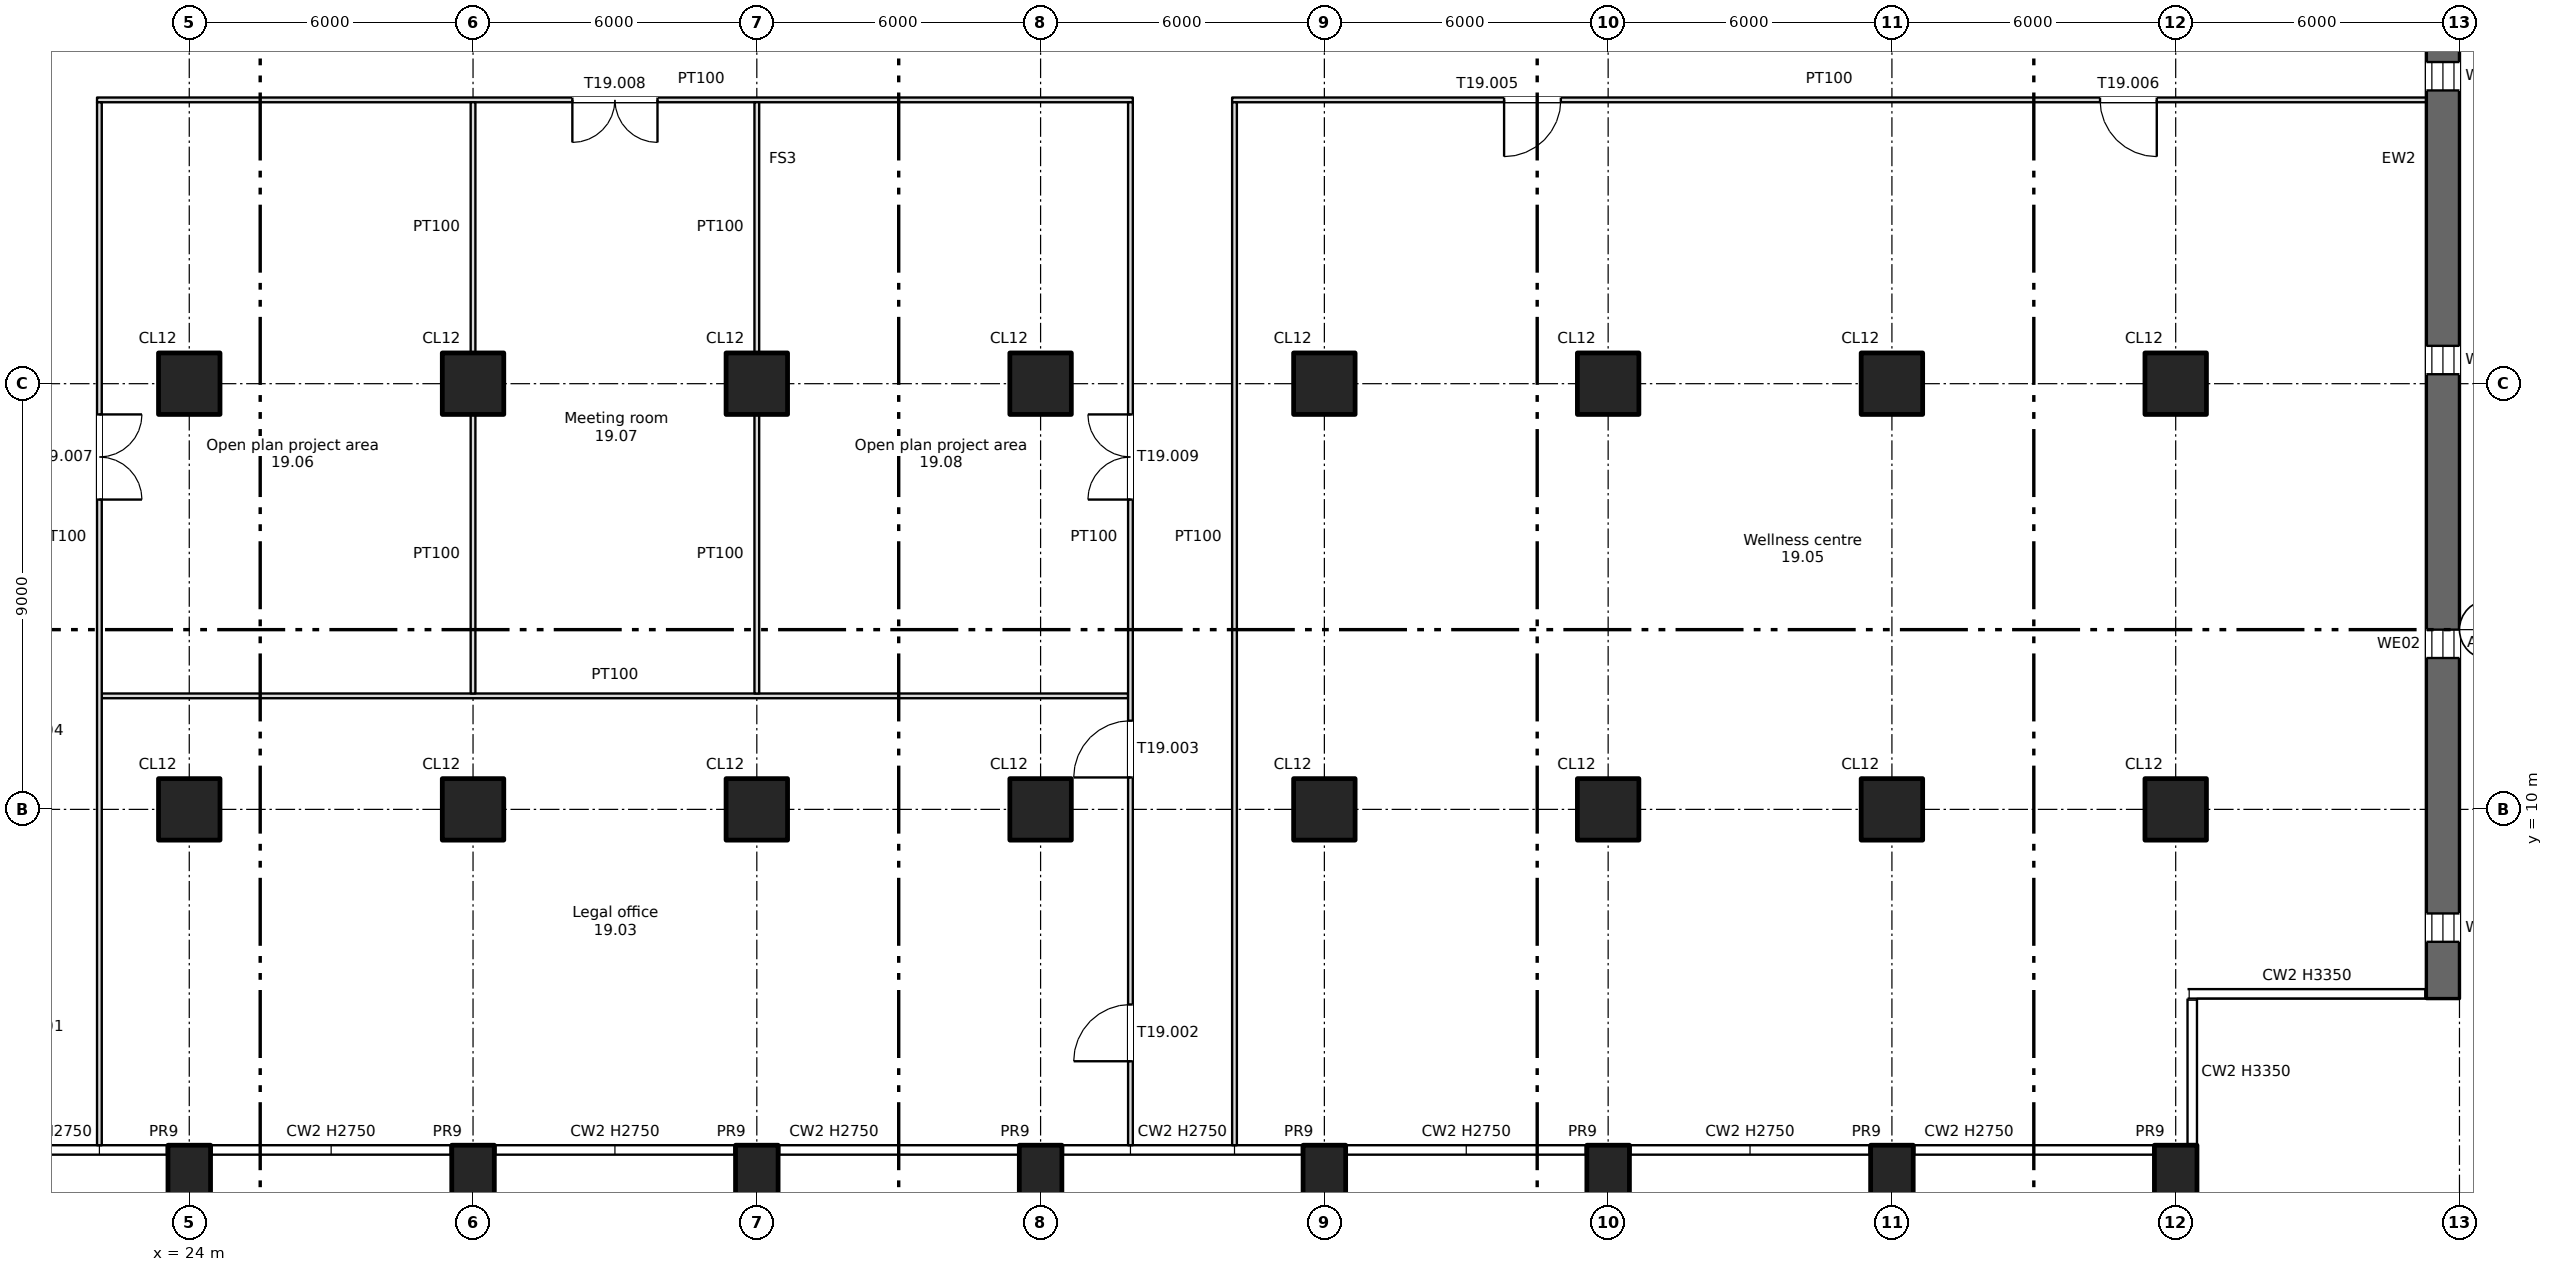
"""IFC4 building model, lengths in metres.
Left out: names, types, materials, properties, quantities, classifications, styles, units other than length and angle.
Written with IfcOpenShell. Run it as: python <this file> out.ifc"""

import sys

from ifc_helpers import new_model, si_unit, direction, frame, frame_2d, origin, origin_2d, place, context, subcontext, project, spatial, rectangle, extrude, element, fill, save


model = new_model("IFC4")
c1 = context("Model", 3, precision=1e-05, world=origin(), true_north=direction((0.0, 1.0)))
c2 = subcontext(c1, "Body", "Model", "MODEL_VIEW")
j1 = project(units=[si_unit("LENGTHUNIT", "METRE"), si_unit("PLANEANGLEUNIT", "RADIAN")], contexts=[c1])
p1 = place(None, origin())
s1 = spatial("IfcSite", under=j1, at=p1, CompositionType="ELEMENT")
p2 = place(p1, origin())
s2 = spatial("IfcBuilding", under=s1, at=p2, CompositionType="ELEMENT")
p3 = place(p2, frame((0.0, 0.0, 125.0)))
s3 = spatial("IfcBuildingStorey", under=s2, at=p3, CompositionType="ELEMENT", Elevation=125.0)
for number, where, z_axis, x_axis in (
    (1, (24.0, 2.2, -0.4), (0.0, 0.0, 1.0), (1.0, 0.0, 0.0)),
    (2, (30.0, 2.2, -0.4), (0.0, 0.0, 1.0), (1.0, 0.0, 0.0)),
    (3, (36.0, 2.2, -0.4), (0.0, 0.0, 1.0), (1.0, 0.0, 0.0)),
    (4, (42.0, 2.2, -0.4), (0.0, 0.0, 1.0), (1.0, 0.0, 0.0)),
    (5, (48.0, 2.2, -0.4), (0.0, 0.0, 1.0), (1.0, 0.0, 0.0)),
    (6, (54.0, 2.2, -0.4), (0.0, 0.0, 1.0), (1.0, 0.0, 0.0)),
    (7, (60.0, 2.2, -0.4), (0.0, 0.0, 1.0), (1.0, 0.0, 0.0)),
    (8, (66.0, 2.2, -0.4), (0.0, 0.0, 1.0), (1.0, 0.0, 0.0)),
):
    element("IfcColumn", number, at=place(p3, frame(where, z_axis=z_axis, x_axis=x_axis)), inside=s3, PredefinedType="COLUMN", context=c2, shape_type="SweptSolid", body=[
        extrude(rectangle(XDim=0.9, YDim=1.4, at=origin_2d()), origin(), (0.0, 0.0, 1.0), 3.75),
    ])
for number, where, z_axis, x_axis in (
    (9, (24.0, 10.0, 0.0), (0.0, 0.0, 1.0), (1.0, 0.0, 0.0)),
    (10, (24.0, 19.0, 0.0), (0.0, 0.0, 1.0), (1.0, 0.0, 0.0)),
    (11, (30.0, 10.0, 0.0), (0.0, 0.0, 1.0), (1.0, 0.0, 0.0)),
    (12, (30.0, 19.0, 0.0), (0.0, 0.0, 1.0), (1.0, 0.0, 0.0)),
    (13, (36.0, 10.0, 0.0), (0.0, 0.0, 1.0), (1.0, 0.0, 0.0)),
    (14, (36.0, 19.0, 0.0), (0.0, 0.0, 1.0), (1.0, 0.0, 0.0)),
    (15, (42.0, 10.0, 0.0), (0.0, 0.0, 1.0), (1.0, 0.0, 0.0)),
    (16, (42.0, 19.0, 0.0), (0.0, 0.0, 1.0), (1.0, 0.0, 0.0)),
    (17, (48.0, 10.0, 0.0), (0.0, 0.0, 1.0), (1.0, 0.0, 0.0)),
    (18, (48.0, 19.0, 0.0), (0.0, 0.0, 1.0), (1.0, 0.0, 0.0)),
    (19, (54.0, 10.0, 0.0), (0.0, 0.0, 1.0), (1.0, 0.0, 0.0)),
    (20, (54.0, 19.0, 0.0), (0.0, 0.0, 1.0), (1.0, 0.0, 0.0)),
    (21, (60.0, 10.0, 0.0), (0.0, 0.0, 1.0), (1.0, 0.0, 0.0)),
    (22, (60.0, 19.0, 0.0), (0.0, 0.0, 1.0), (1.0, 0.0, 0.0)),
    (23, (66.0, 10.0, 0.0), (0.0, 0.0, 1.0), (1.0, 0.0, 0.0)),
    (24, (66.0, 19.0, 0.0), (0.0, 0.0, 1.0), (1.0, 0.0, 0.0)),
):
    element("IfcColumn", number, at=place(p3, frame(where, z_axis=z_axis, x_axis=x_axis)), inside=s3, PredefinedType="COLUMN", context=c2, shape_type="SweptSolid", body=[
        extrude(rectangle(XDim=1.3, YDim=1.3, at=origin_2d()), origin(), (0.0, 0.0, 1.0), 3.35),
    ])
p4 = place(p3, frame((71.65, 6.0, 0.0), z_axis=(0.0, 0.0, 1.0), x_axis=(0.0, 1.0, 0.0)))
e25 = element("IfcWall", 25, at=p4, inside=s3, PredefinedType="SHEAR", context=c2, shape_type="SweptSolid", body=[
    extrude(rectangle(XDim=35.5, YDim=0.7, at=frame_2d((17.75, 0.0))), origin(), (0.0, 0.0, 1.0), 3.35),
])
p5 = place(p4, frame((1.2, 0.0, 0.6)))
e26 = element("IfcOpeningElement", 26, at=p5, cuts=e25, PredefinedType="OPENING", context=c2, shape_type="SweptSolid", body=[
    extrude(rectangle(XDim=0.6, YDim=2.4, at=frame_2d((0.3, 1.2))), frame((0.0, 0.36, 0.0), z_axis=(0.0, -1.0, 0.0), x_axis=(1.0, 0.0, 0.0)), (0.0, 0.0, 1.0), 0.72),
])
p6 = place(p4, frame((7.2, 0.0, 0.6)))
e27 = element("IfcOpeningElement", 27, at=p6, cuts=e25, PredefinedType="OPENING", context=c2, shape_type="SweptSolid", body=[
    extrude(rectangle(XDim=0.6, YDim=2.4, at=frame_2d((0.3, 1.2))), frame((0.0, 0.36, 0.0), z_axis=(0.0, -1.0, 0.0), x_axis=(1.0, 0.0, 0.0)), (0.0, 0.0, 1.0), 0.72),
])
p7 = place(p4, frame((13.2, 0.0, 0.6)))
e28 = element("IfcOpeningElement", 28, at=p7, cuts=e25, PredefinedType="OPENING", context=c2, shape_type="SweptSolid", body=[
    extrude(rectangle(XDim=0.6, YDim=2.4, at=frame_2d((0.3, 1.2))), frame((0.0, 0.36, 0.0), z_axis=(0.0, -1.0, 0.0), x_axis=(1.0, 0.0, 0.0)), (0.0, 0.0, 1.0), 0.72),
])
p8 = place(p4, frame((19.2, 0.0, 0.6)))
e29 = element("IfcOpeningElement", 29, at=p8, cuts=e25, PredefinedType="OPENING", context=c2, shape_type="SweptSolid", body=[
    extrude(rectangle(XDim=0.6, YDim=2.4, at=frame_2d((0.3, 1.2))), frame((0.0, 0.36, 0.0), z_axis=(0.0, -1.0, 0.0), x_axis=(1.0, 0.0, 0.0)), (0.0, 0.0, 1.0), 0.72),
])
p9 = place(p4, frame((25.2, 0.0, 0.6)))
e30 = element("IfcOpeningElement", 30, at=p9, cuts=e25, PredefinedType="OPENING", context=c2, shape_type="SweptSolid", body=[
    extrude(rectangle(XDim=0.6, YDim=2.4, at=frame_2d((0.3, 1.2))), frame((0.0, 0.36, 0.0), z_axis=(0.0, -1.0, 0.0), x_axis=(1.0, 0.0, 0.0)), (0.0, 0.0, 1.0), 0.72),
])
p10 = place(p4, frame((31.2, 0.0, 0.6)))
e31 = element("IfcOpeningElement", 31, at=p10, cuts=e25, PredefinedType="OPENING", context=c2, shape_type="SweptSolid", body=[
    extrude(rectangle(XDim=0.6, YDim=2.4, at=frame_2d((0.3, 1.2))), frame((0.0, 0.36, 0.0), z_axis=(0.0, -1.0, 0.0), x_axis=(1.0, 0.0, 0.0)), (0.0, 0.0, 1.0), 0.72),
])
p11 = place(p3, frame((22.15, 12.4, 0.0), z_axis=(0.0, 0.0, 1.0), x_axis=(1.0, 0.0, 0.0)))
e32 = element("IfcWall", 32, at=p11, inside=s3, PredefinedType="PARTITIONING", context=c2, shape_type="SweptSolid", body=[
    extrude(rectangle(XDim=21.7, YDim=0.1, at=frame_2d((10.85, 0.0))), origin(), (0.0, 0.0, 1.0), 3.35),
])
p12 = place(p3, frame((22.05, 25.0, 0.0), z_axis=(0.0, 0.0, 1.0), x_axis=(1.0, 0.0, 0.0)))
e33 = element("IfcWall", 33, at=p12, inside=s3, PredefinedType="PARTITIONING", context=c2, shape_type="SweptSolid", body=[
    extrude(rectangle(XDim=21.9, YDim=0.1, at=frame_2d((10.95, 0.0))), origin(), (0.0, 0.0, 1.0), 3.35),
])
p13 = place(p12, frame((10.05, 0.0, 0.0)))
e34 = element("IfcOpeningElement", 34, at=p13, cuts=e33, PredefinedType="OPENING", context=c2, shape_type="SweptSolid", body=[
    extrude(rectangle(XDim=1.8, YDim=2.1, at=frame_2d((0.9, 1.05))), frame((0.0, 0.06, 0.0), z_axis=(0.0, -1.0, 0.0), x_axis=(1.0, 0.0, 0.0)), (0.0, 0.0, 1.0), 0.12),
])
p14 = place(p3, frame((46.05, 25.0, 0.0), z_axis=(0.0, 0.0, 1.0), x_axis=(1.0, 0.0, 0.0)))
e35 = element("IfcWall", 35, at=p14, inside=s3, PredefinedType="PARTITIONING", context=c2, shape_type="SweptSolid", body=[
    extrude(rectangle(XDim=25.25, YDim=0.1, at=frame_2d((12.625, 0.0))), origin(), (0.0, 0.0, 1.0), 3.35),
])
p15 = place(p14, frame((5.75, 0.0, 0.0)))
e36 = element("IfcOpeningElement", 36, at=p15, cuts=e35, PredefinedType="OPENING", context=c2, shape_type="SweptSolid", body=[
    extrude(rectangle(XDim=1.2, YDim=2.1, at=frame_2d((0.6, 1.05))), frame((0.0, 0.06, 0.0), z_axis=(0.0, -1.0, 0.0), x_axis=(1.0, 0.0, 0.0)), (0.0, 0.0, 1.0), 0.12),
])
p16 = place(p14, frame((18.35, 0.0, 0.0)))
e37 = element("IfcOpeningElement", 37, at=p16, cuts=e35, PredefinedType="OPENING", context=c2, shape_type="SweptSolid", body=[
    extrude(rectangle(XDim=1.2, YDim=2.1, at=frame_2d((0.6, 1.05))), frame((0.0, 0.06, 0.0), z_axis=(0.0, -1.0, 0.0), x_axis=(1.0, 0.0, 0.0)), (0.0, 0.0, 1.0), 0.12),
])
p17 = place(p3, frame((22.1, 2.9, 0.0), z_axis=(0.0, 0.0, 1.0), x_axis=(0.0, 1.0, 0.0)))
e38 = element("IfcWall", 38, at=p17, inside=s3, PredefinedType="PARTITIONING", context=c2, shape_type="SweptSolid", body=[
    extrude(rectangle(XDim=22.05, YDim=0.1, at=frame_2d((11.025, 0.0))), origin(), (0.0, 0.0, 1.0), 3.35),
])
p18 = place(p17, frame((13.65, 0.0, 0.0)))
e39 = element("IfcOpeningElement", 39, at=p18, cuts=e38, PredefinedType="OPENING", context=c2, shape_type="SweptSolid", body=[
    extrude(rectangle(XDim=1.8, YDim=2.1, at=frame_2d((0.9, 1.05))), frame((0.0, 0.06, 0.0), z_axis=(0.0, -1.0, 0.0), x_axis=(1.0, 0.0, 0.0)), (0.0, 0.0, 1.0), 0.12),
])
p19 = place(p3, frame((30.0, 12.45, 0.0), z_axis=(0.0, 0.0, 1.0), x_axis=(0.0, 1.0, 0.0)))
e40 = element("IfcWall", 40, at=p19, inside=s3, PredefinedType="PARTITIONING", context=c2, shape_type="SweptSolid", body=[
    extrude(rectangle(XDim=5.9, YDim=0.1, at=frame_2d((2.95, 0.0))), origin(), (0.0, 0.0, 1.0), 3.35),
])
p20 = place(p3, frame((30.0, 19.65, 0.0), z_axis=(0.0, 0.0, 1.0), x_axis=(0.0, 1.0, 0.0)))
e41 = element("IfcWall", 41, at=p20, inside=s3, PredefinedType="PARTITIONING", context=c2, shape_type="SweptSolid", body=[
    extrude(rectangle(XDim=5.3, YDim=0.1, at=frame_2d((2.65, 0.0))), origin(), (0.0, 0.0, 1.0), 3.35),
])
p21 = place(p3, frame((36.0, 12.45, 0.0), z_axis=(0.0, 0.0, 1.0), x_axis=(0.0, 1.0, 0.0)))
e42 = element("IfcWall", 42, at=p21, inside=s3, PredefinedType="PARTITIONING", context=c2, shape_type="SweptSolid", body=[
    extrude(rectangle(XDim=5.9, YDim=0.1, at=frame_2d((2.95, 0.0))), origin(), (0.0, 0.0, 1.0), 3.35),
])
p22 = place(p3, frame((36.0, 19.65, 0.0), z_axis=(0.0, 0.0, 1.0), x_axis=(0.0, 1.0, 0.0)))
e43 = element("IfcWall", 43, at=p22, inside=s3, PredefinedType="PARTITIONING", context=c2, shape_type="SweptSolid", body=[
    extrude(rectangle(XDim=5.3, YDim=0.1, at=frame_2d((2.65, 0.0))), origin(), (0.0, 0.0, 1.0), 3.35),
])
p23 = place(p3, frame((43.9, 2.9, 0.0), z_axis=(0.0, 0.0, 1.0), x_axis=(0.0, 1.0, 0.0)))
e44 = element("IfcWall", 44, at=p23, inside=s3, PredefinedType="PARTITIONING", context=c2, shape_type="SweptSolid", body=[
    extrude(rectangle(XDim=22.05, YDim=0.1, at=frame_2d((11.025, 0.0))), origin(), (0.0, 0.0, 1.0), 3.35),
])
p24 = place(p23, frame((1.775, 0.0, 0.0)))
e45 = element("IfcOpeningElement", 45, at=p24, cuts=e44, PredefinedType="OPENING", context=c2, shape_type="SweptSolid", body=[
    extrude(rectangle(XDim=1.2, YDim=2.1, at=frame_2d((0.6, 1.05))), frame((0.0, 0.06, 0.0), z_axis=(0.0, -1.0, 0.0), x_axis=(1.0, 0.0, 0.0)), (0.0, 0.0, 1.0), 0.12),
])
p25 = place(p23, frame((7.775, 0.0, 0.0)))
e46 = element("IfcOpeningElement", 46, at=p25, cuts=e44, PredefinedType="OPENING", context=c2, shape_type="SweptSolid", body=[
    extrude(rectangle(XDim=1.2, YDim=2.1, at=frame_2d((0.6, 1.05))), frame((0.0, 0.06, 0.0), z_axis=(0.0, -1.0, 0.0), x_axis=(1.0, 0.0, 0.0)), (0.0, 0.0, 1.0), 0.12),
])
p26 = place(p23, frame((13.65, 0.0, 0.0)))
e47 = element("IfcOpeningElement", 47, at=p26, cuts=e44, PredefinedType="OPENING", context=c2, shape_type="SweptSolid", body=[
    extrude(rectangle(XDim=1.8, YDim=2.1, at=frame_2d((0.9, 1.05))), frame((0.0, 0.06, 0.0), z_axis=(0.0, -1.0, 0.0), x_axis=(1.0, 0.0, 0.0)), (0.0, 0.0, 1.0), 0.12),
])
p27 = place(p3, frame((46.1, 2.9, 0.0), z_axis=(0.0, 0.0, 1.0), x_axis=(0.0, 1.0, 0.0)))
e48 = element("IfcWall", 48, at=p27, inside=s3, PredefinedType="PARTITIONING", context=c2, shape_type="SweptSolid", body=[
    extrude(rectangle(XDim=22.05, YDim=0.1, at=frame_2d((11.025, 0.0))), origin(), (0.0, 0.0, 1.0), 3.35),
])
p28 = place(p5, origin())
e49 = element("IfcWindow", 49, at=p28, inside=s3, PartitioningType="SINGLE_PANEL", PredefinedType="WINDOW", context=c2, shape_type="SweptSolid", body=[
    extrude(rectangle(XDim=0.6, YDim=2.4, at=frame_2d((0.3, 1.2))), frame((0.0, 0.03, 0.0), z_axis=(0.0, -1.0, 0.0), x_axis=(1.0, 0.0, 0.0)), (0.0, 0.0, 1.0), 0.06),
])
fill(e26, e49)
p29 = place(p6, origin())
e50 = element("IfcWindow", 50, at=p29, inside=s3, PartitioningType="SINGLE_PANEL", PredefinedType="WINDOW", context=c2, shape_type="SweptSolid", body=[
    extrude(rectangle(XDim=0.6, YDim=2.4, at=frame_2d((0.3, 1.2))), frame((0.0, 0.03, 0.0), z_axis=(0.0, -1.0, 0.0), x_axis=(1.0, 0.0, 0.0)), (0.0, 0.0, 1.0), 0.06),
])
fill(e27, e50)
p30 = place(p7, origin())
e51 = element("IfcWindow", 51, at=p30, inside=s3, PartitioningType="SINGLE_PANEL", PredefinedType="WINDOW", context=c2, shape_type="SweptSolid", body=[
    extrude(rectangle(XDim=0.6, YDim=2.4, at=frame_2d((0.3, 1.2))), frame((0.0, 0.03, 0.0), z_axis=(0.0, -1.0, 0.0), x_axis=(1.0, 0.0, 0.0)), (0.0, 0.0, 1.0), 0.06),
])
fill(e28, e51)
p31 = place(p8, origin())
e52 = element("IfcWindow", 52, at=p31, inside=s3, PartitioningType="SINGLE_PANEL", PredefinedType="WINDOW", context=c2, shape_type="SweptSolid", body=[
    extrude(rectangle(XDim=0.6, YDim=2.4, at=frame_2d((0.3, 1.2))), frame((0.0, 0.03, 0.0), z_axis=(0.0, -1.0, 0.0), x_axis=(1.0, 0.0, 0.0)), (0.0, 0.0, 1.0), 0.06),
])
fill(e29, e52)
p32 = place(p24, origin())
e53 = element("IfcDoor", 53, at=p32, inside=s3, OperationType="SINGLE_SWING_LEFT", PredefinedType="DOOR", context=c2, shape_type="SweptSolid", body=[
    extrude(rectangle(XDim=1.2, YDim=2.1, at=frame_2d((0.6, 1.05))), frame((0.0, 0.025, 0.0), z_axis=(0.0, -1.0, 0.0), x_axis=(1.0, 0.0, 0.0)), (0.0, 0.0, 1.0), 0.05),
])
fill(e45, e53)
p33 = place(p25, origin())
e54 = element("IfcDoor", 54, at=p33, inside=s3, OperationType="SINGLE_SWING_LEFT", PredefinedType="DOOR", context=c2, shape_type="SweptSolid", body=[
    extrude(rectangle(XDim=1.2, YDim=2.1, at=frame_2d((0.6, 1.05))), frame((0.0, 0.025, 0.0), z_axis=(0.0, -1.0, 0.0), x_axis=(1.0, 0.0, 0.0)), (0.0, 0.0, 1.0), 0.05),
])
fill(e46, e54)
p34 = place(p15, origin())
e55 = element("IfcDoor", 55, at=p34, inside=s3, OperationType="SINGLE_SWING_LEFT", PredefinedType="DOOR", context=c2, shape_type="SweptSolid", body=[
    extrude(rectangle(XDim=1.2, YDim=2.1, at=frame_2d((0.6, 1.05))), frame((0.0, 0.025, 0.0), z_axis=(0.0, -1.0, 0.0), x_axis=(1.0, 0.0, 0.0)), (0.0, 0.0, 1.0), 0.05),
])
fill(e36, e55)
p35 = place(p16, origin())
e56 = element("IfcDoor", 56, at=p35, inside=s3, OperationType="SINGLE_SWING_RIGHT", PredefinedType="DOOR", context=c2, shape_type="SweptSolid", body=[
    extrude(rectangle(XDim=1.2, YDim=2.1, at=frame_2d((0.6, 1.05))), frame((0.0, 0.025, 0.0), z_axis=(0.0, -1.0, 0.0), x_axis=(1.0, 0.0, 0.0)), (0.0, 0.0, 1.0), 0.05),
])
fill(e37, e56)
p36 = place(p18, origin())
e57 = element("IfcDoor", 57, at=p36, inside=s3, OperationType="DOUBLE_DOOR_SINGLE_SWING", PredefinedType="DOOR", context=c2, shape_type="SweptSolid", body=[
    extrude(rectangle(XDim=1.8, YDim=2.1, at=frame_2d((0.9, 1.05))), frame((0.0, 0.025, 0.0), z_axis=(0.0, -1.0, 0.0), x_axis=(1.0, 0.0, 0.0)), (0.0, 0.0, 1.0), 0.05),
])
fill(e39, e57)
p37 = place(p13, origin())
e58 = element("IfcDoor", 58, at=p37, inside=s3, OperationType="DOUBLE_DOOR_SINGLE_SWING", PredefinedType="DOOR", context=c2, shape_type="SweptSolid", body=[
    extrude(rectangle(XDim=1.8, YDim=2.1, at=frame_2d((0.9, 1.05))), frame((0.0, 0.025, 0.0), z_axis=(0.0, -1.0, 0.0), x_axis=(1.0, 0.0, 0.0)), (0.0, 0.0, 1.0), 0.05),
])
fill(e34, e58)
p38 = place(p26, origin())
e59 = element("IfcDoor", 59, at=p38, inside=s3, OperationType="DOUBLE_DOOR_SINGLE_SWING", PredefinedType="DOOR", context=c2, shape_type="SweptSolid", body=[
    extrude(rectangle(XDim=1.8, YDim=2.1, at=frame_2d((0.9, 1.05))), frame((0.0, 0.025, 0.0), z_axis=(0.0, -1.0, 0.0), x_axis=(1.0, 0.0, 0.0)), (0.0, 0.0, 1.0), 0.05),
])
fill(e47, e59)
save(model, sys.argv[1])
